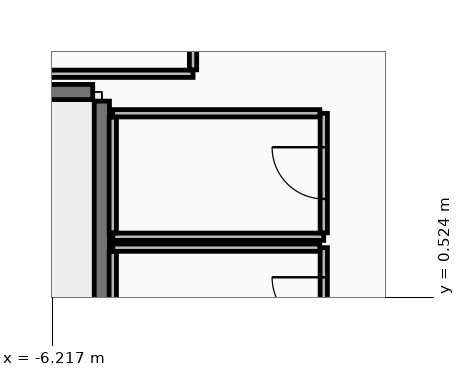
"""IFC4 building model, lengths in metres.
Left out: names, types, materials, properties, quantities, classifications, styles, units other than length and angle.
Written with IfcOpenShell. Run it as: python <this file> out.ifc"""

import sys

from ifc_helpers import new_model, si_unit, direction, frame, frame_2d, origin, place, context, subcontext, project, spatial, rectangle, extrude, element, fill, save


model = new_model("IFC4")
c1 = context("Model", 3, precision=1e-05, world=origin(), true_north=direction((0.0, 1.0)))
c2 = subcontext(c1, "Body", "Model", "MODEL_VIEW")
j1 = project(units=[si_unit("LENGTHUNIT", "METRE"), si_unit("PLANEANGLEUNIT", "RADIAN")], contexts=[c1])
p1 = place(None, origin())
s1 = spatial("IfcSite", under=j1, at=p1, CompositionType="ELEMENT")
p2 = place(p1, origin())
s2 = spatial("IfcBuilding", under=s1, at=p2, CompositionType="ELEMENT")
p3 = place(p2, frame((0.0, 0.0, 45.45)))
s3 = spatial("IfcBuildingStorey", under=s2, at=p3, CompositionType="ELEMENT", Elevation=45.45)
p4 = place(p3, frame((-5.4, -3.55, 0.0), z_axis=(0.0, 0.0, 1.0), x_axis=(0.0, 1.0, 0.0)))
e1 = element("IfcWall", 1, at=p4, inside=s3, PredefinedType="SHEAR", context=c2, shape_type="SweptSolid", body=[
    extrude(rectangle(XDim=7.3, YDim=0.25, at=frame_2d((3.65, 0.0))), origin(), (0.0, 0.0, 1.0), 3.225),
])
p5 = place(p3, frame((-8.5, 3.9, 0.0), z_axis=(0.0, 0.0, 1.0), x_axis=(1.0, 0.0, 0.0)))
e2 = element("IfcWall", 2, at=p5, inside=s3, PredefinedType="SHEAR", context=c2, shape_type="SweptSolid", body=[
    extrude(rectangle(XDim=2.95, YDim=0.25, at=frame_2d((1.475, 0.0))), origin(), (0.0, 0.0, 1.0), 3.225),
])
p6 = place(p3, frame((-5.22, 1.52, 0.0), z_axis=(0.0, 0.0, 1.0), x_axis=(1.0, 0.0, 0.0)))
e3 = element("IfcWall", 3, at=p6, inside=s3, PredefinedType="PARTITIONING", context=c2, shape_type="SweptSolid", body=[
    extrude(rectangle(XDim=3.47, YDim=0.12, at=frame_2d((1.735, 0.0))), origin(), (0.0, 0.0, 1.0), 3.225),
])
p7 = place(p3, frame((-1.75, 1.585, 0.0), z_axis=(0.0, 0.0, 1.0), x_axis=(0.0, 1.0, 0.0)))
e4 = element("IfcWall", 4, at=p7, inside=s3, PredefinedType="PARTITIONING", context=c2, shape_type="SweptSolid", body=[
    extrude(rectangle(XDim=1.965, YDim=0.12, at=frame_2d((0.982, 0.0))), origin(), (0.0, 0.0, 1.0), 3.225),
])
p8 = place(p7, frame((0.557, 0.0, 0.0)))
e5 = element("IfcOpeningElement", 5, at=p8, cuts=e4, PredefinedType="OPENING", context=c2, shape_type="SweptSolid", body=[
    extrude(rectangle(XDim=0.85, YDim=2.1, at=frame_2d((0.425, 1.05))), frame((0.0, 0.07, 0.0), z_axis=(0.0, -1.0, 0.0), x_axis=(1.0, 0.0, 0.0)), (0.0, 0.0, 1.0), 0.14),
])
p9 = place(p3, frame((-1.815, 3.55, 0.0), z_axis=(0.0, 0.0, 1.0), x_axis=(-1.0, 0.0, 0.0)))
e6 = element("IfcWall", 6, at=p9, inside=s3, PredefinedType="PARTITIONING", context=c2, shape_type="SweptSolid", body=[
    extrude(rectangle(XDim=3.405, YDim=0.12, at=frame_2d((1.703, 0.0))), origin(), (0.0, 0.0, 1.0), 3.225),
])
p10 = place(p3, frame((-5.22, 3.485, 0.0), z_axis=(0.0, 0.0, 1.0), x_axis=(0.0, -1.0, 0.0)))
e7 = element("IfcWall", 7, at=p10, inside=s3, PredefinedType="PARTITIONING", context=c2, shape_type="SweptSolid", body=[
    extrude(rectangle(XDim=1.9, YDim=0.12, at=frame_2d((0.95, 0.0))), origin(), (0.0, 0.0, 1.0), 3.225),
])
p11 = place(p3, frame((-1.75, -0.485, 0.0), z_axis=(0.0, 0.0, 1.0), x_axis=(0.0, 1.0, 0.0)))
e8 = element("IfcWall", 8, at=p11, inside=s3, PredefinedType="PARTITIONING", context=c2, shape_type="SweptSolid", body=[
    extrude(rectangle(XDim=1.825, YDim=0.12, at=frame_2d((0.913, 0.0))), origin(), (0.0, 0.0, 1.0), 3.225),
])
p12 = place(p11, frame((0.488, 0.0, 0.0)))
e9 = element("IfcOpeningElement", 9, at=p12, cuts=e8, PredefinedType="OPENING", context=c2, shape_type="SweptSolid", body=[
    extrude(rectangle(XDim=0.85, YDim=2.1, at=frame_2d((0.425, 1.05))), frame((0.0, 0.07, 0.0), z_axis=(0.0, -1.0, 0.0), x_axis=(1.0, 0.0, 0.0)), (0.0, 0.0, 1.0), 0.14),
])
p13 = place(p3, frame((-1.815, 1.34, 0.0), z_axis=(0.0, 0.0, 1.0), x_axis=(-1.0, 0.0, 0.0)))
e10 = element("IfcWall", 10, at=p13, inside=s3, PredefinedType="PARTITIONING", context=c2, shape_type="SweptSolid", body=[
    extrude(rectangle(XDim=3.405, YDim=0.12, at=frame_2d((1.703, 0.0))), origin(), (0.0, 0.0, 1.0), 3.225),
])
p14 = place(p3, frame((-5.22, 1.275, 0.0), z_axis=(0.0, 0.0, 1.0), x_axis=(0.0, -1.0, 0.0)))
e11 = element("IfcWall", 11, at=p14, inside=s3, PredefinedType="PARTITIONING", context=c2, shape_type="SweptSolid", body=[
    extrude(rectangle(XDim=1.76, YDim=0.12, at=frame_2d((0.88, 0.0))), origin(), (0.0, 0.0, 1.0), 3.225),
])
p15 = place(p3, frame((-7.8, 4.2, 0.0), z_axis=(0.0, 0.0, 1.0), x_axis=(1.0, 0.0, 0.0)))
e12 = element("IfcWall", 12, at=p15, inside=s3, PredefinedType="PARTITIONING", context=c2, shape_type="SweptSolid", body=[
    extrude(rectangle(XDim=3.9, YDim=0.12, at=frame_2d((1.95, 0.0))), origin(), (0.0, 0.0, 1.0), 3.225),
])
p16 = place(p3, frame((-3.9, 4.265, 0.0), z_axis=(0.0, 0.0, 1.0), x_axis=(0.0, 1.0, 0.0)))
e13 = element("IfcWall", 13, at=p16, inside=s3, PredefinedType="PARTITIONING", context=c2, shape_type="SweptSolid", body=[
    extrude(rectangle(XDim=3.95, YDim=0.12, at=frame_2d((1.975, 0.0))), origin(), (0.0, 0.0, 1.0), 2.42),
])
p17 = place(p8, frame((0.85, 0.0, 0.0), z_axis=(0.0, 0.0, 1.0), x_axis=(-1.0, 0.0, 0.0)))
e14 = element("IfcDoor", 14, at=p17, inside=s3, OperationType="SINGLE_SWING_RIGHT", PredefinedType="DOOR", context=c2, shape_type="SweptSolid", body=[
    extrude(rectangle(XDim=0.85, YDim=2.1, at=frame_2d((0.425, 1.05))), frame((0.0, 0.025, 0.0), z_axis=(0.0, -1.0, 0.0), x_axis=(1.0, 0.0, 0.0)), (0.0, 0.0, 1.0), 0.05),
])
fill(e5, e14)
p18 = place(p12, frame((0.85, 0.0, 0.0), z_axis=(0.0, 0.0, 1.0), x_axis=(-1.0, 0.0, 0.0)))
e15 = element("IfcDoor", 15, at=p18, inside=s3, OperationType="SINGLE_SWING_RIGHT", PredefinedType="DOOR", context=c2, shape_type="SweptSolid", body=[
    extrude(rectangle(XDim=0.85, YDim=2.1, at=frame_2d((0.425, 1.05))), frame((0.0, 0.025, 0.0), z_axis=(0.0, -1.0, 0.0), x_axis=(1.0, 0.0, 0.0)), (0.0, 0.0, 1.0), 0.05),
])
fill(e9, e15)
save(model, sys.argv[1])
